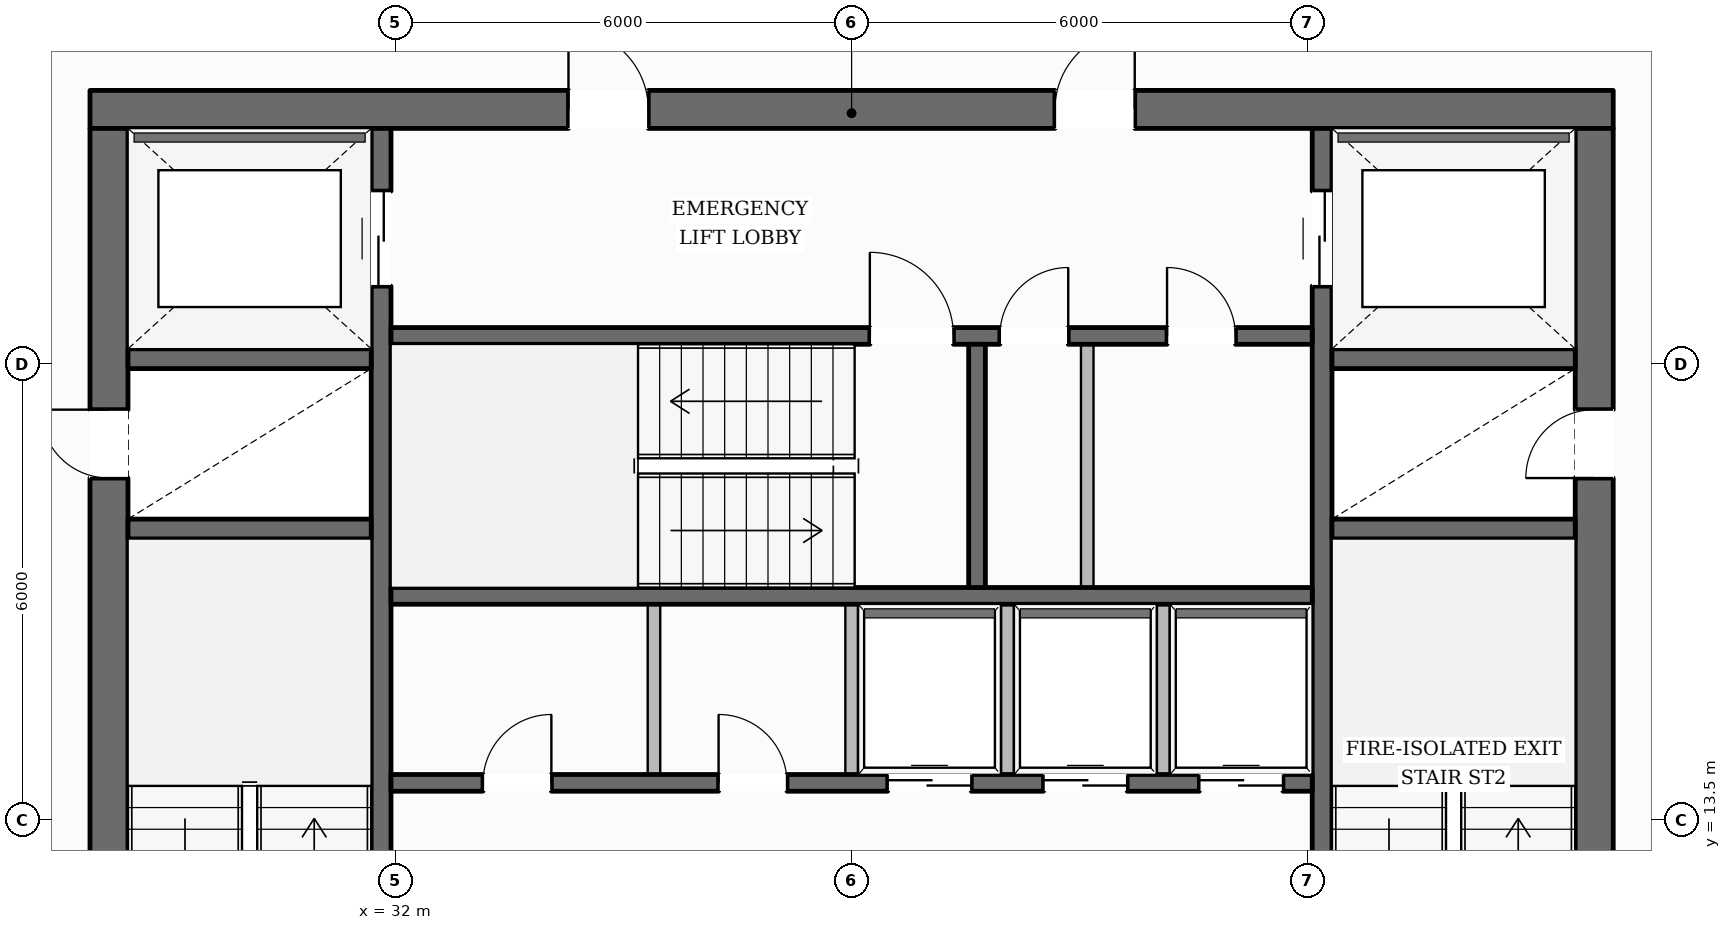
"""IFC4 building model, lengths in metres.
Left out: names, types, materials, properties, quantities, classifications, styles, units other than length and angle.
Written with IfcOpenShell. Run it as: python <this file> out.ifc"""

import sys

from ifc_helpers import new_model, si_unit, direction, frame, frame_2d, origin, place, context, subcontext, project, spatial, rectangle, extrude, element, fill, save


model = new_model("IFC4")
c1 = context("Model", 3, precision=1e-05, world=origin(), true_north=direction((0.0, 1.0)))
c2 = subcontext(c1, "Body", "Model", "MODEL_VIEW")
j1 = project(units=[si_unit("LENGTHUNIT", "METRE"), si_unit("PLANEANGLEUNIT", "RADIAN")], contexts=[c1])
p1 = place(None, origin())
s1 = spatial("IfcSite", under=j1, at=p1, CompositionType="ELEMENT")
p2 = place(p1, origin())
s2 = spatial("IfcBuilding", under=s1, at=p2, CompositionType="ELEMENT")
p3 = place(p2, frame((0.0, 0.0, 131.7)))
s3 = spatial("IfcBuildingStorey", under=s2, at=p3, CompositionType="ELEMENT", Elevation=131.7)
p4 = place(p3, frame((27.98, 22.85, 0.0), z_axis=(0.0, 0.0, 1.0), x_axis=(1.0, 0.0, 0.0)))
e1 = element("IfcWall", 1, at=p4, inside=s3, PredefinedType="SOLIDWALL", context=c2, shape_type="SweptSolid", body=[
    extrude(rectangle(XDim=20.04, YDim=0.5, at=frame_2d((10.02, 0.0))), origin(), (0.0, 0.0, 1.0), 3.6),
])
p5 = place(p4, frame((6.295, 0.0, 0.0)))
e2 = element("IfcOpeningElement", 2, at=p5, cuts=e1, PredefinedType="OPENING", context=c2, shape_type="SweptSolid", body=[
    extrude(rectangle(XDim=1.05, YDim=2.15, at=frame_2d((0.525, 1.075))), frame((0.0, 0.26, 0.0), z_axis=(0.0, -1.0, 0.0), x_axis=(1.0, 0.0, 0.0)), (0.0, 0.0, 1.0), 0.52),
])
p6 = place(p4, frame((12.695, 0.0, 0.0)))
e3 = element("IfcOpeningElement", 3, at=p6, cuts=e1, PredefinedType="OPENING", context=c2, shape_type="SweptSolid", body=[
    extrude(rectangle(XDim=1.05, YDim=2.15, at=frame_2d((0.525, 1.075))), frame((0.0, 0.26, 0.0), z_axis=(0.0, -1.0, 0.0), x_axis=(1.0, 0.0, 0.0)), (0.0, 0.0, 1.0), 0.52),
])
p7 = place(p3, frame((28.23, 9.6, 0.0), z_axis=(0.0, 0.0, 1.0), x_axis=(0.0, 1.0, 0.0)))
e4 = element("IfcWall", 4, at=p7, inside=s3, PredefinedType="SOLIDWALL", context=c2, shape_type="SweptSolid", body=[
    extrude(rectangle(XDim=13.0, YDim=0.5, at=frame_2d((6.5, 0.0))), origin(), (0.0, 0.0, 1.0), 3.6),
])
p8 = place(p7, frame((0.2, 0.0, 0.0)))
e5 = element("IfcOpeningElement", 5, at=p8, cuts=e4, PredefinedType="OPENING", context=c2, shape_type="SweptSolid", body=[
    extrude(rectangle(XDim=1.1, YDim=2.15, at=frame_2d((0.55, 1.075))), frame((0.0, 0.26, 0.0), z_axis=(0.0, -1.0, 0.0), x_axis=(1.0, 0.0, 0.0)), (0.0, 0.0, 1.0), 0.52),
])
p9 = place(p7, frame((8.4, 0.0, 0.0)))
e6 = element("IfcOpeningElement", 6, at=p9, cuts=e4, PredefinedType="OPENING", context=c2, shape_type="SweptSolid", body=[
    extrude(rectangle(XDim=0.9, YDim=2.1, at=frame_2d((0.45, 1.05))), frame((0.0, 0.26, 0.0), z_axis=(0.0, -1.0, 0.0), x_axis=(1.0, 0.0, 0.0)), (0.0, 0.0, 1.0), 0.52),
])
p10 = place(p3, frame((47.77, 9.6, 0.0), z_axis=(0.0, 0.0, 1.0), x_axis=(0.0, 1.0, 0.0)))
e7 = element("IfcWall", 7, at=p10, inside=s3, PredefinedType="SOLIDWALL", context=c2, shape_type="SweptSolid", body=[
    extrude(rectangle(XDim=13.0, YDim=0.5, at=frame_2d((6.5, 0.0))), origin(), (0.0, 0.0, 1.0), 3.6),
])
p11 = place(p10, frame((0.2, 0.0, 0.0)))
e8 = element("IfcOpeningElement", 8, at=p11, cuts=e7, PredefinedType="OPENING", context=c2, shape_type="SweptSolid", body=[
    extrude(rectangle(XDim=1.1, YDim=2.15, at=frame_2d((0.55, 1.075))), frame((0.0, 0.26, 0.0), z_axis=(0.0, -1.0, 0.0), x_axis=(1.0, 0.0, 0.0)), (0.0, 0.0, 1.0), 0.52),
])
p12 = place(p10, frame((8.4, 0.0, 0.0)))
e9 = element("IfcOpeningElement", 9, at=p12, cuts=e7, PredefinedType="OPENING", context=c2, shape_type="SweptSolid", body=[
    extrude(rectangle(XDim=0.9, YDim=2.1, at=frame_2d((0.45, 1.05))), frame((0.0, 0.26, 0.0), z_axis=(0.0, -1.0, 0.0), x_axis=(1.0, 0.0, 0.0)), (0.0, 0.0, 1.0), 0.52),
])
p13 = place(p3, frame((31.81, 9.6, 0.0), z_axis=(0.0, 0.0, 1.0), x_axis=(0.0, 1.0, 0.0)))
e10 = element("IfcWall", 10, at=p13, inside=s3, PredefinedType="SHEAR", context=c2, shape_type="SweptSolid", body=[
    extrude(rectangle(XDim=13.0, YDim=0.26, at=frame_2d((6.5, 0.0))), origin(), (0.0, 0.0, 1.0), 3.6),
])
p14 = place(p13, frame((10.925, 0.0, 0.0)))
e11 = element("IfcOpeningElement", 11, at=p14, cuts=e10, PredefinedType="OPENING", context=c2, shape_type="SweptSolid", body=[
    extrude(rectangle(XDim=1.25, YDim=2.25, at=frame_2d((0.625, 1.125))), frame((0.0, 0.14, 0.0), z_axis=(0.0, -1.0, 0.0), x_axis=(1.0, 0.0, 0.0)), (0.0, 0.0, 1.0), 0.28),
])
p15 = place(p3, frame((44.19, 9.6, 0.0), z_axis=(0.0, 0.0, 1.0), x_axis=(0.0, 1.0, 0.0)))
e12 = element("IfcWall", 12, at=p15, inside=s3, PredefinedType="SHEAR", context=c2, shape_type="SweptSolid", body=[
    extrude(rectangle(XDim=13.0, YDim=0.26, at=frame_2d((6.5, 0.0))), origin(), (0.0, 0.0, 1.0), 3.6),
])
p16 = place(p15, frame((10.925, 0.0, 0.0)))
e13 = element("IfcOpeningElement", 13, at=p16, cuts=e12, PredefinedType="OPENING", context=c2, shape_type="SweptSolid", body=[
    extrude(rectangle(XDim=1.25, YDim=2.25, at=frame_2d((0.625, 1.125))), frame((0.0, 0.14, 0.0), z_axis=(0.0, -1.0, 0.0), x_axis=(1.0, 0.0, 0.0)), (0.0, 0.0, 1.0), 0.28),
])
for number, where, z_axis, x_axis in (
    (14, (28.48, 17.33, 0.0), (0.0, 0.0, 1.0), (1.0, 0.0, 0.0)),
    (15, (28.48, 19.57, 0.0), (0.0, 0.0, 1.0), (1.0, 0.0, 0.0)),
    (16, (44.32, 17.33, 0.0), (0.0, 0.0, 1.0), (1.0, 0.0, 0.0)),
    (17, (44.32, 19.57, 0.0), (0.0, 0.0, 1.0), (1.0, 0.0, 0.0)),
):
    element("IfcWall", number, at=place(p3, frame(where, z_axis=z_axis, x_axis=x_axis)), inside=s3, PredefinedType="SHEAR", context=c2, shape_type="SweptSolid", body=[
        extrude(rectangle(XDim=3.2, YDim=0.26, at=frame_2d((1.6, 0.0))), origin(), (0.0, 0.0, 1.0), 3.6),
    ])
p17 = place(p3, frame((31.94, 19.87, 0.0), z_axis=(0.0, 0.0, 1.0), x_axis=(1.0, 0.0, 0.0)))
e18 = element("IfcWall", 18, at=p17, inside=s3, PredefinedType="SOLIDWALL", context=c2, shape_type="SweptSolid", body=[
    extrude(rectangle(XDim=12.12, YDim=0.22, at=frame_2d((6.06, 0.0))), origin(), (0.0, 0.0, 1.0), 3.6),
])
p18 = place(p17, frame((6.3, 0.0, 0.0)))
e19 = element("IfcOpeningElement", 19, at=p18, cuts=e18, PredefinedType="OPENING", context=c2, shape_type="SweptSolid", body=[
    extrude(rectangle(XDim=1.1, YDim=2.15, at=frame_2d((0.55, 1.075))), frame((0.0, 0.12, 0.0), z_axis=(0.0, -1.0, 0.0), x_axis=(1.0, 0.0, 0.0)), (0.0, 0.0, 1.0), 0.24),
])
p19 = place(p17, frame((8.01, 0.0, 0.0)))
e20 = element("IfcOpeningElement", 20, at=p19, cuts=e18, PredefinedType="OPENING", context=c2, shape_type="SweptSolid", body=[
    extrude(rectangle(XDim=0.9, YDim=2.1, at=frame_2d((0.45, 1.05))), frame((0.0, 0.12, 0.0), z_axis=(0.0, -1.0, 0.0), x_axis=(1.0, 0.0, 0.0)), (0.0, 0.0, 1.0), 0.24),
])
p20 = place(p17, frame((10.21, 0.0, 0.0)))
e21 = element("IfcOpeningElement", 21, at=p20, cuts=e18, PredefinedType="OPENING", context=c2, shape_type="SweptSolid", body=[
    extrude(rectangle(XDim=0.9, YDim=2.1, at=frame_2d((0.45, 1.05))), frame((0.0, 0.12, 0.0), z_axis=(0.0, -1.0, 0.0), x_axis=(1.0, 0.0, 0.0)), (0.0, 0.0, 1.0), 0.24),
])
p21 = place(p3, frame((31.94, 16.45, 0.0), z_axis=(0.0, 0.0, 1.0), x_axis=(1.0, 0.0, 0.0)))
e22 = element("IfcWall", 22, at=p21, inside=s3, PredefinedType="SOLIDWALL", context=c2, shape_type="SweptSolid", body=[
    extrude(rectangle(XDim=12.12, YDim=0.22, at=frame_2d((6.06, 0.0))), origin(), (0.0, 0.0, 1.0), 3.6),
])
p22 = place(p3, frame((39.65, 16.56, 0.0), z_axis=(0.0, 0.0, 1.0), x_axis=(0.0, 1.0, 0.0)))
e23 = element("IfcWall", 23, at=p22, inside=s3, PredefinedType="SOLIDWALL", context=c2, shape_type="SweptSolid", body=[
    extrude(rectangle(XDim=3.2, YDim=0.22, at=frame_2d((1.6, 0.0))), origin(), (0.0, 0.0, 1.0), 3.6),
])
p23 = place(p3, frame((31.94, 13.99, 0.0), z_axis=(0.0, 0.0, 1.0), x_axis=(1.0, 0.0, 0.0)))
e24 = element("IfcWall", 24, at=p23, inside=s3, PredefinedType="SOLIDWALL", context=c2, shape_type="SweptSolid", body=[
    extrude(rectangle(XDim=12.12, YDim=0.22, at=frame_2d((6.06, 0.0))), origin(), (0.0, 0.0, 1.0), 3.6),
])
p24 = place(p23, frame((1.21, 0.0, 0.0)))
e25 = element("IfcOpeningElement", 25, at=p24, cuts=e24, PredefinedType="OPENING", context=c2, shape_type="SweptSolid", body=[
    extrude(rectangle(XDim=0.9, YDim=2.1, at=frame_2d((0.45, 1.05))), frame((0.0, 0.12, 0.0), z_axis=(0.0, -1.0, 0.0), x_axis=(1.0, 0.0, 0.0)), (0.0, 0.0, 1.0), 0.24),
])
p25 = place(p23, frame((4.31, 0.0, 0.0)))
e26 = element("IfcOpeningElement", 26, at=p25, cuts=e24, PredefinedType="OPENING", context=c2, shape_type="SweptSolid", body=[
    extrude(rectangle(XDim=0.9, YDim=2.1, at=frame_2d((0.45, 1.05))), frame((0.0, 0.12, 0.0), z_axis=(0.0, -1.0, 0.0), x_axis=(1.0, 0.0, 0.0)), (0.0, 0.0, 1.0), 0.24),
])
p26 = place(p23, frame((6.535, 0.0, 0.0)))
e27 = element("IfcOpeningElement", 27, at=p26, cuts=e24, PredefinedType="OPENING", context=c2, shape_type="SweptSolid", body=[
    extrude(rectangle(XDim=1.1, YDim=2.2, at=frame_2d((0.55, 1.1))), frame((0.0, 0.12, 0.0), z_axis=(0.0, -1.0, 0.0), x_axis=(1.0, 0.0, 0.0)), (0.0, 0.0, 1.0), 0.24),
])
p27 = place(p23, frame((8.585, 0.0, 0.0)))
e28 = element("IfcOpeningElement", 28, at=p27, cuts=e24, PredefinedType="OPENING", context=c2, shape_type="SweptSolid", body=[
    extrude(rectangle(XDim=1.1, YDim=2.2, at=frame_2d((0.55, 1.1))), frame((0.0, 0.12, 0.0), z_axis=(0.0, -1.0, 0.0), x_axis=(1.0, 0.0, 0.0)), (0.0, 0.0, 1.0), 0.24),
])
p28 = place(p23, frame((10.635, 0.0, 0.0)))
e29 = element("IfcOpeningElement", 29, at=p28, cuts=e24, PredefinedType="OPENING", context=c2, shape_type="SweptSolid", body=[
    extrude(rectangle(XDim=1.1, YDim=2.2, at=frame_2d((0.55, 1.1))), frame((0.0, 0.12, 0.0), z_axis=(0.0, -1.0, 0.0), x_axis=(1.0, 0.0, 0.0)), (0.0, 0.0, 1.0), 0.24),
])
p29 = place(p3, frame((13.485, 12.254, 0.0), z_axis=(0.0, 0.0, 1.0), x_axis=(0.505829244079, 0.862633627813, 0.0)))
e30 = element("IfcWall", 30, at=p29, inside=s3, PredefinedType="STANDARD", context=c2, shape_type="SweptSolid", body=[
    extrude(rectangle(XDim=37.223, YDim=0.38, at=frame_2d((18.611, 0.0))), origin(), (0.0, 0.0, 1.0), 3.059),
])
p30 = place(p29, frame((32.951, 0.0, 0.65)))
e31 = element("IfcOpeningElement", 31, at=p30, cuts=e30, PredefinedType="OPENING", context=c2, shape_type="SweptSolid", body=[
    extrude(rectangle(XDim=1.55, YDim=1.75, at=frame_2d((0.775, 0.875))), frame((0.0, 0.2, 0.0), z_axis=(0.0, -1.0, 0.0), x_axis=(1.0, 0.0, 0.0)), (0.0, 0.0, 1.0), 0.4),
])
p31 = place(p29, frame((26.906, 0.0, 0.65)))
e32 = element("IfcOpeningElement", 32, at=p31, cuts=e30, PredefinedType="OPENING", context=c2, shape_type="SweptSolid", body=[
    extrude(rectangle(XDim=1.55, YDim=1.75, at=frame_2d((0.775, 0.875))), frame((0.0, 0.2, 0.0), z_axis=(0.0, -1.0, 0.0), x_axis=(1.0, 0.0, 0.0)), (0.0, 0.0, 1.0), 0.4),
])
p32 = place(p29, frame((14.817, 0.0, 0.65)))
e33 = element("IfcOpeningElement", 33, at=p32, cuts=e30, PredefinedType="OPENING", context=c2, shape_type="SweptSolid", body=[
    extrude(rectangle(XDim=1.55, YDim=1.75, at=frame_2d((0.775, 0.875))), frame((0.0, 0.2, 0.0), z_axis=(0.0, -1.0, 0.0), x_axis=(1.0, 0.0, 0.0)), (0.0, 0.0, 1.0), 0.4),
])
p33 = place(p29, frame((8.773, 0.0, 0.65)))
e34 = element("IfcOpeningElement", 34, at=p33, cuts=e30, PredefinedType="OPENING", context=c2, shape_type="SweptSolid", body=[
    extrude(rectangle(XDim=1.55, YDim=1.75, at=frame_2d((0.775, 0.875))), frame((0.0, 0.2, 0.0), z_axis=(0.0, -1.0, 0.0), x_axis=(1.0, 0.0, 0.0)), (0.0, 0.0, 1.0), 0.4),
])
p34 = place(p29, frame((2.729, 0.0, 0.65)))
e35 = element("IfcOpeningElement", 35, at=p34, cuts=e30, PredefinedType="OPENING", context=c2, shape_type="SweptSolid", body=[
    extrude(rectangle(XDim=1.55, YDim=1.75, at=frame_2d((0.775, 0.875))), frame((0.0, 0.2, 0.0), z_axis=(0.0, -1.0, 0.0), x_axis=(1.0, 0.0, 0.0)), (0.0, 0.0, 1.0), 0.4),
])
p35 = place(p3, frame((43.687, 44.364, 0.0), z_axis=(0.0, 0.0, 1.0), x_axis=(0.505829244079, -0.862633627813, 0.0)))
e36 = element("IfcWall", 36, at=p35, inside=s3, PredefinedType="STANDARD", context=c2, shape_type="SweptSolid", body=[
    extrude(rectangle(XDim=37.223, YDim=0.38, at=frame_2d((18.611, 0.0))), origin(), (0.0, 0.0, 1.0), 3.059),
])
p36 = place(p35, frame((32.944, 0.0, 0.65)))
e37 = element("IfcOpeningElement", 37, at=p36, cuts=e36, PredefinedType="OPENING", context=c2, shape_type="SweptSolid", body=[
    extrude(rectangle(XDim=1.55, YDim=1.75, at=frame_2d((0.775, 0.875))), frame((0.0, 0.2, 0.0), z_axis=(0.0, -1.0, 0.0), x_axis=(1.0, 0.0, 0.0)), (0.0, 0.0, 1.0), 0.4),
])
p37 = place(p35, frame((26.9, 0.0, 0.65)))
e38 = element("IfcOpeningElement", 38, at=p37, cuts=e36, PredefinedType="OPENING", context=c2, shape_type="SweptSolid", body=[
    extrude(rectangle(XDim=1.55, YDim=1.75, at=frame_2d((0.775, 0.875))), frame((0.0, 0.2, 0.0), z_axis=(0.0, -1.0, 0.0), x_axis=(1.0, 0.0, 0.0)), (0.0, 0.0, 1.0), 0.4),
])
p38 = place(p35, frame((14.811, 0.0, 0.65)))
e39 = element("IfcOpeningElement", 39, at=p38, cuts=e36, PredefinedType="OPENING", context=c2, shape_type="SweptSolid", body=[
    extrude(rectangle(XDim=1.55, YDim=1.75, at=frame_2d((0.775, 0.875))), frame((0.0, 0.2, 0.0), z_axis=(0.0, -1.0, 0.0), x_axis=(1.0, 0.0, 0.0)), (0.0, 0.0, 1.0), 0.4),
])
p39 = place(p35, frame((8.767, 0.0, 0.65)))
e40 = element("IfcOpeningElement", 40, at=p39, cuts=e36, PredefinedType="OPENING", context=c2, shape_type="SweptSolid", body=[
    extrude(rectangle(XDim=1.55, YDim=1.75, at=frame_2d((0.775, 0.875))), frame((0.0, 0.2, 0.0), z_axis=(0.0, -1.0, 0.0), x_axis=(1.0, 0.0, 0.0)), (0.0, 0.0, 1.0), 0.4),
])
p40 = place(p35, frame((2.722, 0.0, 0.65)))
e41 = element("IfcOpeningElement", 41, at=p40, cuts=e36, PredefinedType="OPENING", context=c2, shape_type="SweptSolid", body=[
    extrude(rectangle(XDim=1.55, YDim=1.75, at=frame_2d((0.775, 0.875))), frame((0.0, 0.2, 0.0), z_axis=(0.0, -1.0, 0.0), x_axis=(1.0, 0.0, 0.0)), (0.0, 0.0, 1.0), 0.4),
])
for number, where, z_axis, x_axis in (
    (42, (38.0, 14.1, 0.0), (0.0, 0.0, 1.0), (0.0, 1.0, 0.0)),
    (43, (35.4, 14.1, 0.0), (0.0, 0.0, 1.0), (0.0, 1.0, 0.0)),
    (44, (40.05, 14.1, 0.0), (0.0, 0.0, 1.0), (0.0, 1.0, 0.0)),
    (45, (42.1, 14.1, 0.0), (0.0, 0.0, 1.0), (0.0, 1.0, 0.0)),
):
    element("IfcWall", number, at=place(p3, frame(where, z_axis=z_axis, x_axis=x_axis)), inside=s3, PredefinedType="PARTITIONING", context=c2, shape_type="SweptSolid", body=[
        extrude(rectangle(XDim=2.24, YDim=0.165, at=frame_2d((1.12, 0.0))), origin(), (0.0, 0.0, 1.0), 3.6),
    ])
p41 = place(p3, frame((41.1, 16.56, 0.0), z_axis=(0.0, 0.0, 1.0), x_axis=(0.0, 1.0, 0.0)))
e46 = element("IfcWall", 46, at=p41, inside=s3, PredefinedType="PARTITIONING", context=c2, shape_type="SweptSolid", body=[
    extrude(rectangle(XDim=3.2, YDim=0.165, at=frame_2d((1.6, 0.0))), origin(), (0.0, 0.0, 1.0), 3.6),
])
p42 = place(p18, origin())
e47 = element("IfcDoor", 47, at=p42, inside=s3, OperationType="SINGLE_SWING_LEFT", PredefinedType="DOOR", context=c2, shape_type="SweptSolid", body=[
    extrude(rectangle(XDim=1.1, YDim=2.15, at=frame_2d((0.55, 1.075))), frame((0.0, 0.025, 0.0), z_axis=(0.0, -1.0, 0.0), x_axis=(1.0, 0.0, 0.0)), (0.0, 0.0, 1.0), 0.05),
])
fill(e19, e47)
p43 = place(p9, origin())
e48 = element("IfcDoor", 48, at=p43, inside=s3, OperationType="SINGLE_SWING_RIGHT", PredefinedType="DOOR", context=c2, shape_type="SweptSolid", body=[
    extrude(rectangle(XDim=0.9, YDim=2.1, at=frame_2d((0.45, 1.05))), frame((0.0, 0.025, 0.0), z_axis=(0.0, -1.0, 0.0), x_axis=(1.0, 0.0, 0.0)), (0.0, 0.0, 1.0), 0.05),
])
fill(e6, e48)
p44 = place(p12, origin())
e49 = element("IfcDoor", 49, at=p44, inside=s3, OperationType="SINGLE_SWING_LEFT", PredefinedType="DOOR", context=c2, shape_type="SweptSolid", body=[
    extrude(rectangle(XDim=0.9, YDim=2.1, at=frame_2d((0.45, 1.05))), frame((0.0, 0.025, 0.0), z_axis=(0.0, -1.0, 0.0), x_axis=(1.0, 0.0, 0.0)), (0.0, 0.0, 1.0), 0.05),
])
fill(e9, e49)
p45 = place(p5, origin())
e50 = element("IfcDoor", 50, at=p45, inside=s3, OperationType="SINGLE_SWING_LEFT", PredefinedType="DOOR", context=c2, shape_type="SweptSolid", body=[
    extrude(rectangle(XDim=1.05, YDim=2.15, at=frame_2d((0.525, 1.075))), frame((0.0, 0.025, 0.0), z_axis=(0.0, -1.0, 0.0), x_axis=(1.0, 0.0, 0.0)), (0.0, 0.0, 1.0), 0.05),
])
fill(e2, e50)
p46 = place(p6, origin())
e51 = element("IfcDoor", 51, at=p46, inside=s3, OperationType="SINGLE_SWING_RIGHT", PredefinedType="DOOR", context=c2, shape_type="SweptSolid", body=[
    extrude(rectangle(XDim=1.05, YDim=2.15, at=frame_2d((0.525, 1.075))), frame((0.0, 0.025, 0.0), z_axis=(0.0, -1.0, 0.0), x_axis=(1.0, 0.0, 0.0)), (0.0, 0.0, 1.0), 0.05),
])
fill(e3, e51)
p47 = place(p14, origin())
e52 = element("IfcDoor", 52, at=p47, inside=s3, OperationType="DOUBLE_DOOR_SLIDING", PredefinedType="DOOR", context=c2, shape_type="SweptSolid", body=[
    extrude(rectangle(XDim=1.25, YDim=2.25, at=frame_2d((0.625, 1.125))), frame((0.0, 0.025, 0.0), z_axis=(0.0, -1.0, 0.0), x_axis=(1.0, 0.0, 0.0)), (0.0, 0.0, 1.0), 0.05),
])
fill(e11, e52)
p48 = place(p16, origin())
e53 = element("IfcDoor", 53, at=p48, inside=s3, OperationType="DOUBLE_DOOR_SLIDING", PredefinedType="DOOR", context=c2, shape_type="SweptSolid", body=[
    extrude(rectangle(XDim=1.25, YDim=2.25, at=frame_2d((0.625, 1.125))), frame((0.0, 0.025, 0.0), z_axis=(0.0, -1.0, 0.0), x_axis=(1.0, 0.0, 0.0)), (0.0, 0.0, 1.0), 0.05),
])
fill(e13, e53)
p49 = place(p24, origin())
e54 = element("IfcDoor", 54, at=p49, inside=s3, OperationType="SINGLE_SWING_RIGHT", PredefinedType="DOOR", context=c2, shape_type="SweptSolid", body=[
    extrude(rectangle(XDim=0.9, YDim=2.1, at=frame_2d((0.45, 1.05))), frame((0.0, 0.025, 0.0), z_axis=(0.0, -1.0, 0.0), x_axis=(1.0, 0.0, 0.0)), (0.0, 0.0, 1.0), 0.05),
])
fill(e25, e54)
p50 = place(p25, origin())
e55 = element("IfcDoor", 55, at=p50, inside=s3, OperationType="SINGLE_SWING_LEFT", PredefinedType="DOOR", context=c2, shape_type="SweptSolid", body=[
    extrude(rectangle(XDim=0.9, YDim=2.1, at=frame_2d((0.45, 1.05))), frame((0.0, 0.025, 0.0), z_axis=(0.0, -1.0, 0.0), x_axis=(1.0, 0.0, 0.0)), (0.0, 0.0, 1.0), 0.05),
])
fill(e26, e55)
p51 = place(p26, origin())
e56 = element("IfcDoor", 56, at=p51, inside=s3, OperationType="DOUBLE_DOOR_SLIDING", PredefinedType="DOOR", context=c2, shape_type="SweptSolid", body=[
    extrude(rectangle(XDim=1.1, YDim=2.2, at=frame_2d((0.55, 1.1))), frame((0.0, 0.025, 0.0), z_axis=(0.0, -1.0, 0.0), x_axis=(1.0, 0.0, 0.0)), (0.0, 0.0, 1.0), 0.05),
])
fill(e27, e56)
p52 = place(p27, origin())
e57 = element("IfcDoor", 57, at=p52, inside=s3, OperationType="DOUBLE_DOOR_SLIDING", PredefinedType="DOOR", context=c2, shape_type="SweptSolid", body=[
    extrude(rectangle(XDim=1.1, YDim=2.2, at=frame_2d((0.55, 1.1))), frame((0.0, 0.025, 0.0), z_axis=(0.0, -1.0, 0.0), x_axis=(1.0, 0.0, 0.0)), (0.0, 0.0, 1.0), 0.05),
])
fill(e28, e57)
p53 = place(p28, origin())
e58 = element("IfcDoor", 58, at=p53, inside=s3, OperationType="DOUBLE_DOOR_SLIDING", PredefinedType="DOOR", context=c2, shape_type="SweptSolid", body=[
    extrude(rectangle(XDim=1.1, YDim=2.2, at=frame_2d((0.55, 1.1))), frame((0.0, 0.025, 0.0), z_axis=(0.0, -1.0, 0.0), x_axis=(1.0, 0.0, 0.0)), (0.0, 0.0, 1.0), 0.05),
])
fill(e29, e58)
p54 = place(p19, origin())
e59 = element("IfcDoor", 59, at=p54, inside=s3, OperationType="SINGLE_SWING_RIGHT", PredefinedType="DOOR", context=c2, shape_type="SweptSolid", body=[
    extrude(rectangle(XDim=0.9, YDim=2.1, at=frame_2d((0.45, 1.05))), frame((0.0, 0.025, 0.0), z_axis=(0.0, -1.0, 0.0), x_axis=(1.0, 0.0, 0.0)), (0.0, 0.0, 1.0), 0.05),
])
fill(e20, e59)
p55 = place(p20, origin())
e60 = element("IfcDoor", 60, at=p55, inside=s3, OperationType="SINGLE_SWING_LEFT", PredefinedType="DOOR", context=c2, shape_type="SweptSolid", body=[
    extrude(rectangle(XDim=0.9, YDim=2.1, at=frame_2d((0.45, 1.05))), frame((0.0, 0.025, 0.0), z_axis=(0.0, -1.0, 0.0), x_axis=(1.0, 0.0, 0.0)), (0.0, 0.0, 1.0), 0.05),
])
fill(e21, e60)
save(model, sys.argv[1])
